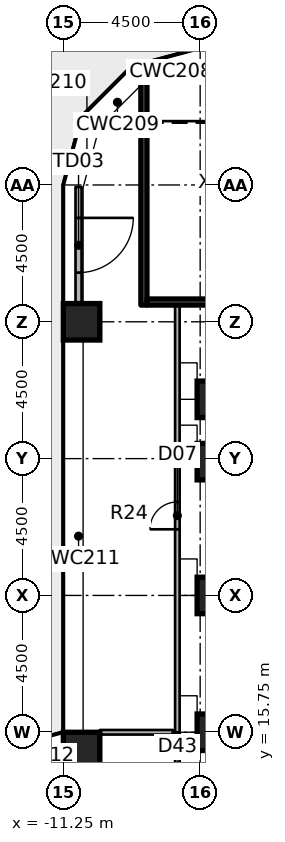
"""IFC4 building model, lengths in metres.
Left out: names, types, materials, properties, quantities, classifications, styles, units other than length and angle.
Written with IfcOpenShell. Run it as: python <this file> out.ifc"""

import sys

from ifc_helpers import new_model, si_unit, direction, frame, frame_2d, origin, origin_2d, place, context, subcontext, project, spatial, rectangle, extrude, element, fill, save


model = new_model("IFC4")
c1 = context("Model", 3, precision=1e-05, world=origin(), true_north=direction((0.0, 1.0)))
c2 = subcontext(c1, "Body", "Model", "MODEL_VIEW")
j1 = project(units=[si_unit("LENGTHUNIT", "METRE"), si_unit("PLANEANGLEUNIT", "RADIAN")], contexts=[c1])
p1 = place(None, origin())
s1 = spatial("IfcSite", under=j1, at=p1, CompositionType="ELEMENT")
p2 = place(p1, origin())
s2 = spatial("IfcBuilding", under=s1, at=p2, CompositionType="ELEMENT")
p3 = place(p2, frame((0.0, 0.0, 22.0)))
s3 = spatial("IfcBuildingStorey", under=s2, at=p3, CompositionType="ELEMENT", Elevation=22.0)
for number, where, z_axis, x_axis in (
    (1, (-10.65, 15.15, 0.0), (0.0, 0.0, 1.0), (1.0, 0.0, 0.0)),
    (2, (-10.65, 29.25, 0.0), (0.0, 0.0, 1.0), (1.0, 0.0, 0.0)),
):
    element("IfcColumn", number, at=place(p3, frame(where, z_axis=z_axis, x_axis=x_axis)), inside=s3, PredefinedType="COLUMN", context=c2, shape_type="SweptSolid", body=[
        extrude(rectangle(XDim=1.2, YDim=1.2, at=origin_2d()), origin(), (0.0, 0.0, 1.0), 4.55),
    ])
for number, where, z_axis, x_axis in (
    (3, (-6.25, 15.75, 0.0), (0.0, 0.0, 1.0), (1.0, 0.0, 0.0)),
    (4, (-6.25, 20.25, 0.0), (0.0, 0.0, 1.0), (1.0, 0.0, 0.0)),
    (5, (-6.25, 24.65, 0.0), (0.0, 0.0, 1.0), (1.0, 0.0, 0.0)),
    (6, (-6.25, 26.7, 0.0), (0.0, 0.0, 1.0), (1.0, 0.0, 0.0)),
):
    element("IfcColumn", number, at=place(p3, frame(where, z_axis=z_axis, x_axis=x_axis)), inside=s3, PredefinedType="COLUMN", context=c2, shape_type="SweptSolid", body=[
        extrude(rectangle(XDim=1.2, YDim=1.2, at=origin_2d()), origin(), (0.0, 0.0, 1.0), 4.85),
    ])
p4 = place(p3, frame((-10.75, 33.684, 0.0), z_axis=(0.0, 0.0, 1.0), x_axis=(0.0, -1.0, 0.0)))
e7 = element("IfcWall", 7, at=p4, inside=s3, PredefinedType="SOLIDWALL", context=c2, shape_type="SweptSolid", body=[
    extrude(rectangle(XDim=3.834, YDim=0.2, at=frame_2d((1.917, 0.0))), origin(), (0.0, 0.0, 1.0), 3.95),
])
p5 = place(p4, frame((1.017, 0.0, 0.0)))
e8 = element("IfcOpeningElement", 8, at=p5, cuts=e7, PredefinedType="OPENING", context=c2, shape_type="SweptSolid", body=[
    extrude(rectangle(XDim=1.8, YDim=2.4, at=frame_2d((0.9, 1.2))), frame((0.0, 0.11, 0.0), z_axis=(0.0, -1.0, 0.0), x_axis=(1.0, 0.0, 0.0)), (0.0, 0.0, 1.0), 0.22),
])
p6 = place(p3, frame((-8.6, 29.8, 0.0), z_axis=(0.0, 0.0, 1.0), x_axis=(0.0, 1.0, 0.0)))
e9 = element("IfcWall", 9, at=p6, inside=s3, PredefinedType="SHEAR", context=c2, shape_type="SweptSolid", body=[
    extrude(rectangle(XDim=8.0, YDim=0.2, at=frame_2d((4.0, 0.0))), origin(), (0.0, 0.0, 1.0), 4.55),
])
for number, where, z_axis, x_axis in (
    (10, (-8.5, 29.9, 0.0), (0.0, 0.0, 1.0), (1.0, 0.0, 0.0)),
    (11, (-8.5, 37.7, 0.0), (0.0, 0.0, 1.0), (1.0, 0.0, 0.0)),
):
    element("IfcWall", number, at=place(p3, frame(where, z_axis=z_axis, x_axis=x_axis)), inside=s3, PredefinedType="SHEAR", context=c2, shape_type="SweptSolid", body=[
        extrude(rectangle(XDim=4.2, YDim=0.2, at=frame_2d((2.1, 0.0))), origin(), (0.0, 0.0, 1.0), 4.55),
    ])
p7 = place(p3, frame((-7.5, 8.25, 0.0), z_axis=(0.0, 0.0, 1.0), x_axis=(0.0, 1.0, 0.0)))
e12 = element("IfcWall", 12, at=p7, inside=s3, PredefinedType="PARTITIONING", context=c2, shape_type="SweptSolid", body=[
    extrude(rectangle(XDim=7.5, YDim=0.15, at=frame_2d((3.75, 0.0))), origin(), (0.0, 0.0, 1.0), 3.93),
])
p8 = place(p7, frame((4.5, 0.0, 0.0)))
e13 = element("IfcOpeningElement", 13, at=p8, cuts=e12, PredefinedType="OPENING", context=c2, shape_type="SweptSolid", body=[
    extrude(rectangle(XDim=1.0, YDim=2.1, at=frame_2d((0.5, 1.05))), frame((0.0, 0.085, 0.0), z_axis=(0.0, -1.0, 0.0), x_axis=(1.0, 0.0, 0.0)), (0.0, 0.0, 1.0), 0.17),
])
p9 = place(p3, frame((-7.5, 15.75, 0.0), z_axis=(0.0, 0.0, 1.0), x_axis=(0.0, 1.0, 0.0)))
e14 = element("IfcWall", 14, at=p9, inside=s3, PredefinedType="PARTITIONING", context=c2, shape_type="SweptSolid", body=[
    extrude(rectangle(XDim=14.25, YDim=0.15, at=frame_2d((7.125, 0.0))), origin(), (0.0, 0.0, 1.0), 4.55),
])
p10 = place(p9, frame((6.675, 0.0, 0.0)))
e15 = element("IfcOpeningElement", 15, at=p10, cuts=e14, PredefinedType="OPENING", context=c2, shape_type="SweptSolid", body=[
    extrude(rectangle(XDim=0.9, YDim=2.1, at=frame_2d((0.45, 1.05))), frame((0.0, 0.085, 0.0), z_axis=(0.0, -1.0, 0.0), x_axis=(1.0, 0.0, 0.0)), (0.0, 0.0, 1.0), 0.17),
])
p11 = place(p3, frame((-10.05, 15.75, 0.0), z_axis=(0.0, 0.0, 1.0), x_axis=(1.0, 0.0, 0.0)))
e16 = element("IfcWall", 16, at=p11, inside=s3, PredefinedType="PARTITIONING", context=c2, shape_type="SweptSolid", body=[
    extrude(rectangle(XDim=2.4, YDim=0.15, at=frame_2d((1.2, 0.0))), origin(), (0.0, 0.0, 1.0), 4.55),
])
p12 = place(p5, origin())
e17 = element("IfcDoor", 17, at=p12, inside=s3, OperationType="SINGLE_SWING_LEFT", PredefinedType="DOOR", context=c2, shape_type="SweptSolid", body=[
    extrude(rectangle(XDim=1.8, YDim=2.4, at=frame_2d((0.9, 1.2))), frame((0.0, 0.025, 0.0), z_axis=(0.0, -1.0, 0.0), x_axis=(1.0, 0.0, 0.0)), (0.0, 0.0, 1.0), 0.05),
])
fill(e8, e17)
p13 = place(p10, origin())
e18 = element("IfcDoor", 18, at=p13, inside=s3, OperationType="SINGLE_SWING_LEFT", PredefinedType="DOOR", context=c2, shape_type="SweptSolid", body=[
    extrude(rectangle(XDim=0.9, YDim=2.1, at=frame_2d((0.45, 1.05))), frame((0.0, 0.025, 0.0), z_axis=(0.0, -1.0, 0.0), x_axis=(1.0, 0.0, 0.0)), (0.0, 0.0, 1.0), 0.05),
])
fill(e15, e18)
save(model, sys.argv[1])
